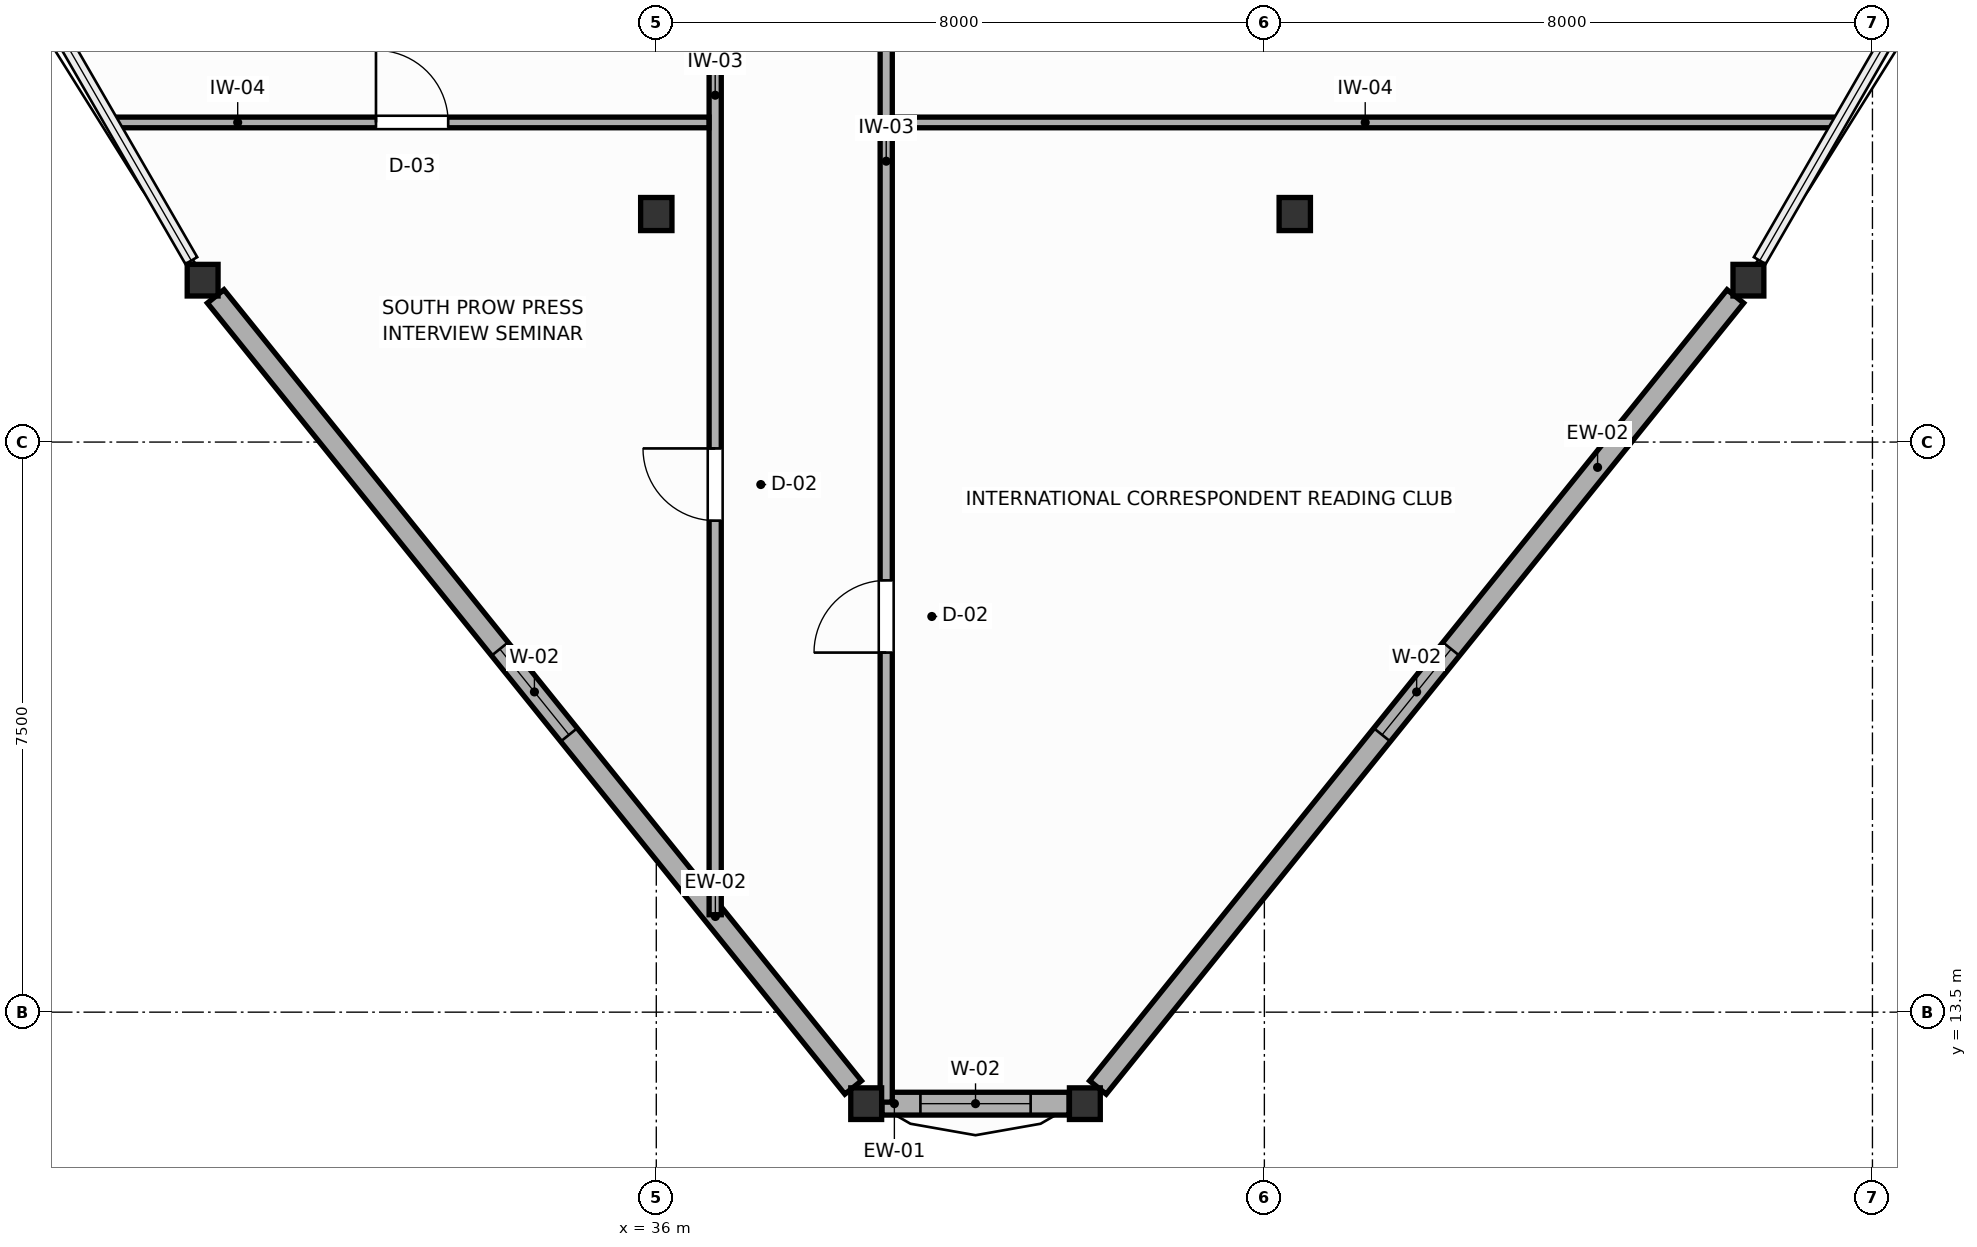
"""IFC4 building model, lengths in metres.
Left out: names, types, materials, properties, quantities, classifications, styles, units other than length and angle.
Written with IfcOpenShell. Run it as: python <this file> out.ifc"""

import sys

from ifc_helpers import new_model, si_unit, direction, frame, frame_2d, origin, origin_2d, place, context, subcontext, project, spatial, rectangle, i_section, extrude, source, transform, mapped, element, fill, save


model = new_model("IFC4")
c1 = context("Model", 3, precision=1e-05, world=origin(), true_north=direction((0.0, 1.0)))
c2 = subcontext(c1, "Body", "Model", "MODEL_VIEW")
j1 = project(units=[si_unit("LENGTHUNIT", "METRE"), si_unit("PLANEANGLEUNIT", "RADIAN")], contexts=[c1])
p1 = place(None, origin())
s1 = spatial("IfcSite", under=j1, at=p1, CompositionType="ELEMENT")
p2 = place(p1, origin())
s2 = spatial("IfcBuilding", under=s1, at=p2, CompositionType="ELEMENT")
p3 = place(p2, frame((0.0, 0.0, 227.4)))
s3 = spatial("IfcBuildingStorey", under=s2, at=p3, CompositionType="ELEMENT", Elevation=227.4)
m1 = source(origin(), c2, "Body", "SweptSolid", [
    extrude(i_section(OverallWidth=0.412, OverallDepth=0.435, WebThickness=0.033, FlangeThickness=0.053, FilletRadius=0.015, at=origin_2d()), origin(), (0.0, 0.0, 1.0), 3.6),
])
for number, where, z_axis, x_axis in (
    (1, (44.4, 24.0, 0.0), (0.0, 0.0, 1.0), (1.0, 0.0, 0.0)),
    (2, (36.0, 24.0, 0.0), (0.0, 0.0, 1.0), (1.0, 0.0, 0.0)),
):
    element("IfcColumn", number, at=place(p3, frame(where, z_axis=z_axis, x_axis=x_axis)), inside=s3, PredefinedType="COLUMN", context=c2, shape_type="MappedRepresentation", body=[
        mapped(m1, transform((0.0, 0.0, 0.0), scale=1.0)),
    ])
m2 = source(origin(), c2, "Body", "SweptSolid", [
    extrude(i_section(OverallWidth=0.406, OverallDepth=0.416, WebThickness=0.027, FlangeThickness=0.044, FilletRadius=0.015, at=origin_2d()), origin(), (0.0, 0.0, 1.0), 3.6),
])
for number, where, z_axis, x_axis in (
    (3, (30.032, 23.13, 0.0), (0.0, 0.0, 1.0), (1.0, 0.0, 0.0)),
    (4, (38.762, 12.296, 0.0), (0.0, 0.0, 1.0), (1.0, 0.0, 0.0)),
    (5, (41.638, 12.296, 0.0), (0.0, 0.0, 1.0), (1.0, 0.0, 0.0)),
    (6, (50.368, 23.13, 0.0), (0.0, 0.0, 1.0), (1.0, 0.0, 0.0)),
):
    element("IfcColumn", number, at=place(p3, frame(where, z_axis=z_axis, x_axis=x_axis)), inside=s3, PredefinedType="COLUMN", context=c2, shape_type="MappedRepresentation", body=[
        mapped(m2, transform((0.0, 0.0, 0.0), scale=1.0)),
    ])
p4 = place(p3, frame((30.203, 22.917, 0.0), z_axis=(0.0, 0.0, 1.0), x_axis=(0.627453225305, -0.778654255786, 0.0)))
e7 = element("IfcWall", 7, at=p4, inside=s3, PredefinedType="SOLIDWALL", context=c2, shape_type="SweptSolid", body=[
    extrude(rectangle(XDim=13.366, YDim=0.28, at=frame_2d((6.683, 0.0))), origin(), (0.0, 0.0, 1.0), 2.96),
])
p5 = place(p4, frame((5.958, 0.0, 0.75)))
e8 = element("IfcOpeningElement", 8, at=p5, cuts=e7, PredefinedType="OPENING", context=c2, shape_type="SweptSolid", body=[
    extrude(rectangle(XDim=1.45, YDim=1.65, at=frame_2d((0.725, 0.825))), frame((0.0, 0.15, 0.0), z_axis=(0.0, -1.0, 0.0), x_axis=(1.0, 0.0, 0.0)), (0.0, 0.0, 1.0), 0.3),
])
p6 = place(p3, frame((38.969, 12.296, 0.0), z_axis=(0.0, 0.0, 1.0), x_axis=(1.0, 0.0, 0.0)))
e9 = element("IfcWall", 9, at=p6, inside=s3, PredefinedType="SOLIDWALL", context=c2, shape_type="SweptSolid", body=[
    extrude(rectangle(XDim=2.461, YDim=0.3, at=frame_2d((1.23, 0.0))), origin(), (0.0, 0.0, 1.0), 3.02),
])
p7 = place(p6, frame((0.505, 0.0, 0.75)))
e10 = element("IfcOpeningElement", 10, at=p7, cuts=e9, PredefinedType="OPENING", context=c2, shape_type="SweptSolid", body=[
    extrude(rectangle(XDim=1.45, YDim=1.65, at=frame_2d((0.725, 0.825))), frame((0.0, 0.16, 0.0), z_axis=(0.0, -1.0, 0.0), x_axis=(1.0, 0.0, 0.0)), (0.0, 0.0, 1.0), 0.32),
])
p8 = place(p3, frame((41.81, 12.509, 0.0), z_axis=(0.0, 0.0, 1.0), x_axis=(0.627453225305, 0.778654255786, 0.0)))
e11 = element("IfcWall", 11, at=p8, inside=s3, PredefinedType="SOLIDWALL", context=c2, shape_type="SweptSolid", body=[
    extrude(rectangle(XDim=13.366, YDim=0.28, at=frame_2d((6.683, 0.0))), origin(), (0.0, 0.0, 1.0), 2.96),
])
p9 = place(p8, frame((5.958, 0.0, 0.75)))
e12 = element("IfcOpeningElement", 12, at=p9, cuts=e11, PredefinedType="OPENING", context=c2, shape_type="SweptSolid", body=[
    extrude(rectangle(XDim=1.45, YDim=1.65, at=frame_2d((0.725, 0.825))), frame((0.0, 0.15, 0.0), z_axis=(0.0, -1.0, 0.0), x_axis=(1.0, 0.0, 0.0)), (0.0, 0.0, 1.0), 0.3),
])
p10 = place(p3, frame((39.025, 12.316, 0.0), z_axis=(0.0, 0.0, 1.0), x_axis=(0.0, 1.0, 0.0)))
e13 = element("IfcWall", 13, at=p10, inside=s3, PredefinedType="PARTITIONING", context=c2, shape_type="SweptSolid", body=[
    extrude(rectangle(XDim=17.714, YDim=0.16, at=frame_2d((8.857, 0.0))), origin(), (0.0, 0.0, 1.0), 3.41),
])
p11 = place(p10, frame((5.914, 0.0, 0.0)))
e14 = element("IfcOpeningElement", 14, at=p11, cuts=e13, PredefinedType="OPENING", context=c2, shape_type="SweptSolid", body=[
    extrude(rectangle(XDim=0.95, YDim=2.05, at=frame_2d((0.475, 1.025))), frame((0.0, 0.09, 0.0), z_axis=(0.0, -1.0, 0.0), x_axis=(1.0, 0.0, 0.0)), (0.0, 0.0, 1.0), 0.18),
])
p12 = place(p3, frame((36.775, 14.781, 0.0), z_axis=(0.0, 0.0, 1.0), x_axis=(0.0, 1.0, 0.0)))
e15 = element("IfcWall", 15, at=p12, inside=s3, PredefinedType="PARTITIONING", context=c2, shape_type="SweptSolid", body=[
    extrude(rectangle(XDim=15.249, YDim=0.16, at=frame_2d((7.624, 0.0))), origin(), (0.0, 0.0, 1.0), 2.96),
])
p13 = place(p12, frame((5.185, 0.0, 0.0)))
e16 = element("IfcOpeningElement", 16, at=p13, cuts=e15, PredefinedType="OPENING", context=c2, shape_type="SweptSolid", body=[
    extrude(rectangle(XDim=0.95, YDim=2.05, at=frame_2d((0.475, 1.025))), frame((0.0, 0.09, 0.0), z_axis=(0.0, -1.0, 0.0), x_axis=(1.0, 0.0, 0.0)), (0.0, 0.0, 1.0), 0.18),
])
p14 = place(p3, frame((39.107, 25.205, 0.0), z_axis=(0.0, 0.0, 1.0), x_axis=(1.0, 0.0, 0.0)))
e17 = element("IfcWall", 17, at=p14, inside=s3, PredefinedType="PARTITIONING", context=c2, shape_type="SweptSolid", body=[
    extrude(rectangle(XDim=12.439, YDim=0.14, at=frame_2d((6.22, 0.0))), origin(), (0.0, 0.0, 1.0), 3.41),
])
p15 = place(p3, frame((28.854, 25.205, 0.0), z_axis=(0.0, 0.0, 1.0), x_axis=(1.0, 0.0, 0.0)))
e18 = element("IfcWall", 18, at=p15, inside=s3, PredefinedType="PARTITIONING", context=c2, shape_type="SweptSolid", body=[
    extrude(rectangle(XDim=7.84, YDim=0.14, at=frame_2d((3.92, 0.0))), origin(), (0.0, 0.0, 1.0), 3.41),
])
p16 = place(p15, frame((3.459, 0.0, 0.0)))
e19 = element("IfcOpeningElement", 19, at=p16, cuts=e18, PredefinedType="OPENING", context=c2, shape_type="SweptSolid", body=[
    extrude(rectangle(XDim=0.95, YDim=2.05, at=frame_2d((0.475, 1.025))), frame((0.0, 0.08, 0.0), z_axis=(0.0, -1.0, 0.0), x_axis=(1.0, 0.0, 0.0)), (0.0, 0.0, 1.0), 0.16),
])
p17 = place(p5, origin())
e20 = element("IfcWindow", 20, at=p17, inside=s3, PartitioningType="SINGLE_PANEL", PredefinedType="WINDOW", context=c2, shape_type="SweptSolid", body=[
    extrude(rectangle(XDim=1.45, YDim=1.65, at=frame_2d((0.725, 0.825))), frame((0.0, 0.03, 0.0), z_axis=(0.0, -1.0, 0.0), x_axis=(1.0, 0.0, 0.0)), (0.0, 0.0, 1.0), 0.06),
])
fill(e8, e20)
p18 = place(p7, origin())
e21 = element("IfcWindow", 21, at=p18, inside=s3, PartitioningType="SINGLE_PANEL", PredefinedType="WINDOW", context=c2, shape_type="SweptSolid", body=[
    extrude(rectangle(XDim=1.45, YDim=1.65, at=frame_2d((0.725, 0.825))), frame((0.0, 0.03, 0.0), z_axis=(0.0, -1.0, 0.0), x_axis=(1.0, 0.0, 0.0)), (0.0, 0.0, 1.0), 0.06),
])
fill(e10, e21)
p19 = place(p9, origin())
e22 = element("IfcWindow", 22, at=p19, inside=s3, PartitioningType="SINGLE_PANEL", PredefinedType="WINDOW", context=c2, shape_type="SweptSolid", body=[
    extrude(rectangle(XDim=1.45, YDim=1.65, at=frame_2d((0.725, 0.825))), frame((0.0, 0.03, 0.0), z_axis=(0.0, -1.0, 0.0), x_axis=(1.0, 0.0, 0.0)), (0.0, 0.0, 1.0), 0.06),
])
fill(e12, e22)
p20 = place(p11, origin())
e23 = element("IfcDoor", 23, at=p20, inside=s3, OperationType="SINGLE_SWING_LEFT", PredefinedType="DOOR", context=c2, shape_type="SweptSolid", body=[
    extrude(rectangle(XDim=0.95, YDim=2.05, at=frame_2d((0.475, 1.025))), frame((0.0, 0.025, 0.0), z_axis=(0.0, -1.0, 0.0), x_axis=(1.0, 0.0, 0.0)), (0.0, 0.0, 1.0), 0.05),
])
fill(e14, e23)
p21 = place(p13, origin())
e24 = element("IfcDoor", 24, at=p21, inside=s3, OperationType="SINGLE_SWING_RIGHT", PredefinedType="DOOR", context=c2, shape_type="SweptSolid", body=[
    extrude(rectangle(XDim=0.95, YDim=2.05, at=frame_2d((0.475, 1.025))), frame((0.0, 0.025, 0.0), z_axis=(0.0, -1.0, 0.0), x_axis=(1.0, 0.0, 0.0)), (0.0, 0.0, 1.0), 0.05),
])
fill(e16, e24)
p22 = place(p16, origin())
e25 = element("IfcDoor", 25, at=p22, inside=s3, OperationType="SINGLE_SWING_LEFT", PredefinedType="DOOR", context=c2, shape_type="SweptSolid", body=[
    extrude(rectangle(XDim=0.95, YDim=2.05, at=frame_2d((0.475, 1.025))), frame((0.0, 0.025, 0.0), z_axis=(0.0, -1.0, 0.0), x_axis=(1.0, 0.0, 0.0)), (0.0, 0.0, 1.0), 0.05),
])
fill(e19, e25)
save(model, sys.argv[1])
